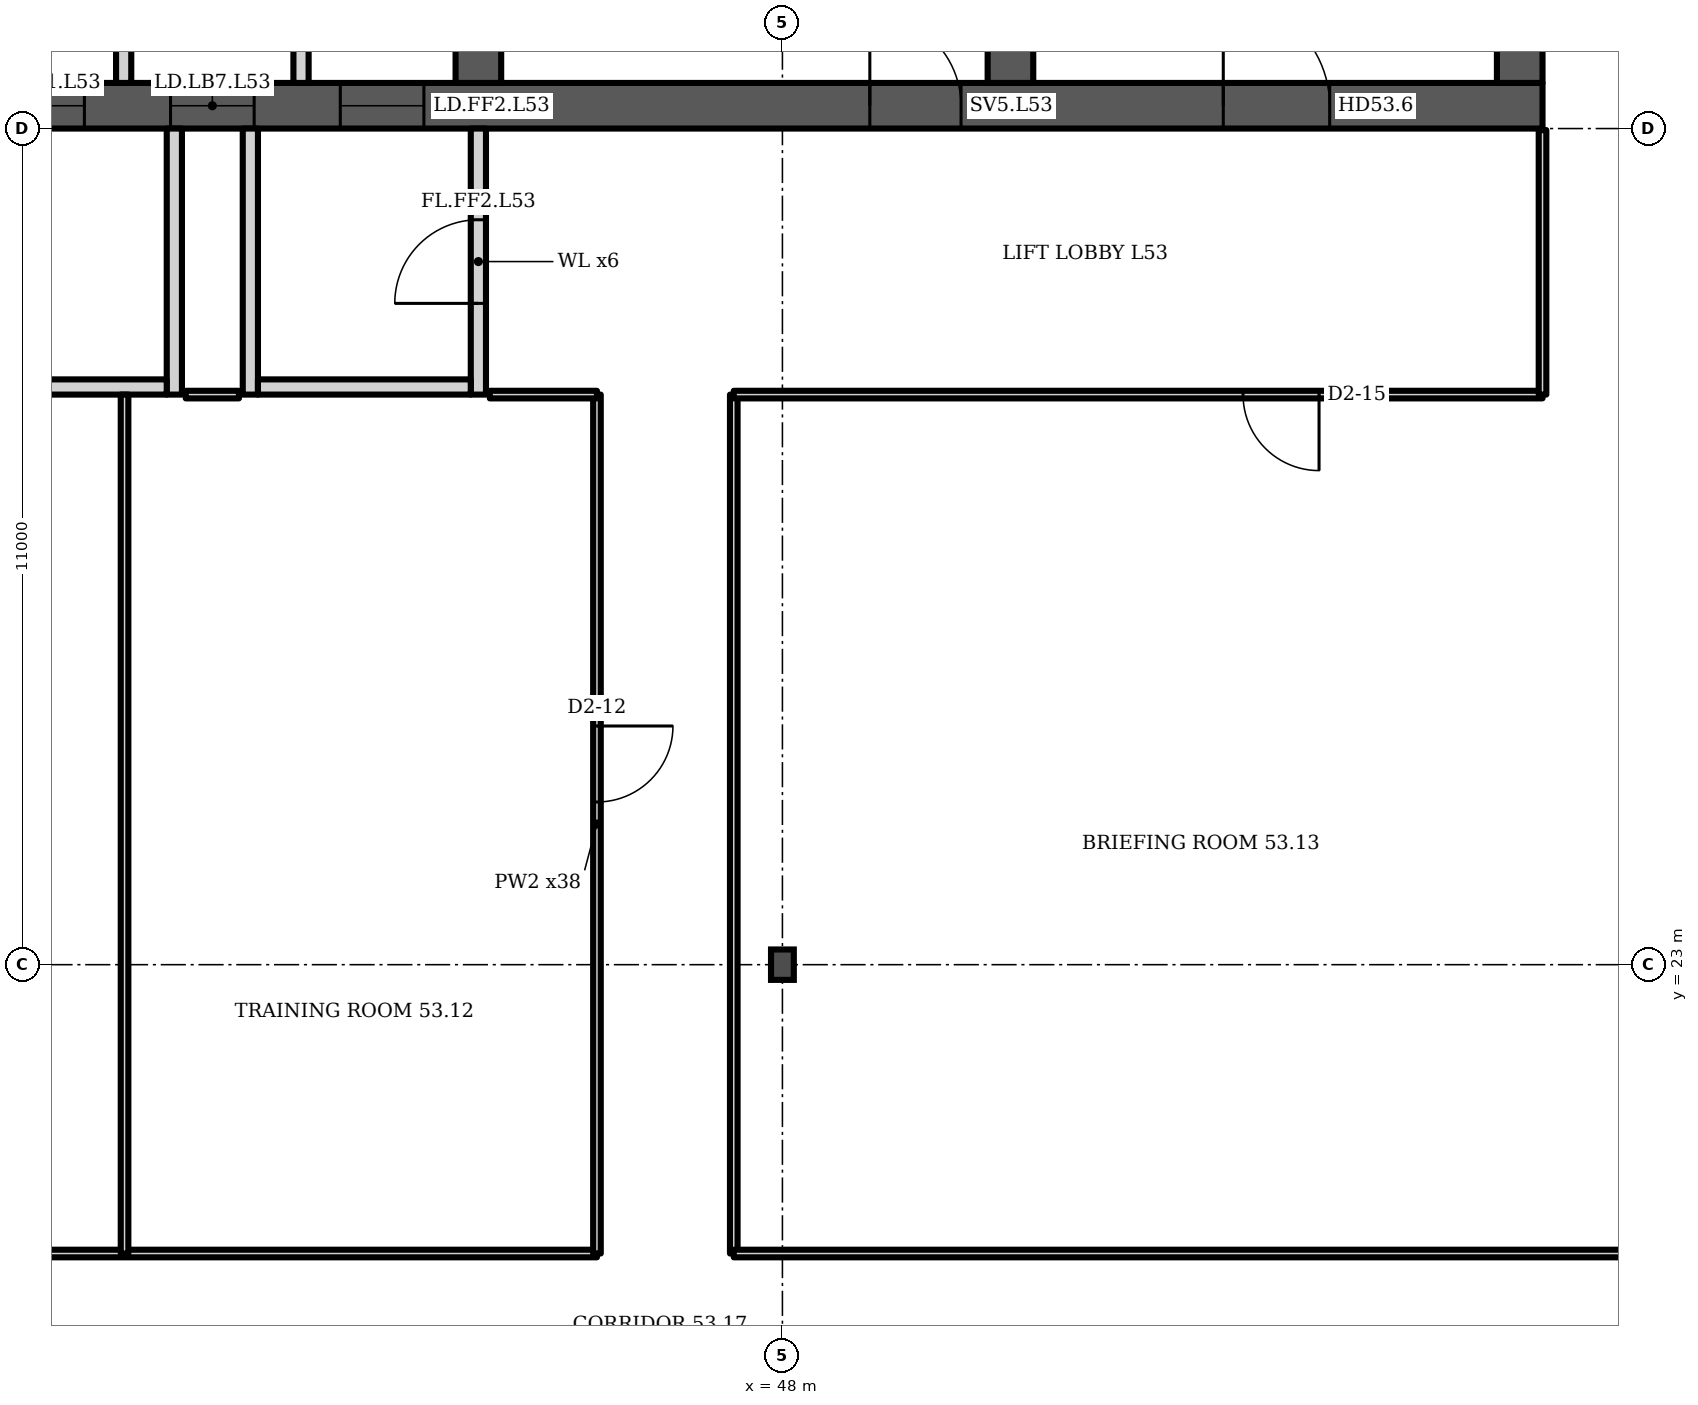
"""IFC4 building model, lengths in metres.
Left out: names, types, materials, properties, quantities, classifications, styles, units other than length and angle.
Written with IfcOpenShell. Run it as: python <this file> out.ifc"""

import sys

from ifc_helpers import new_model, si_unit, direction, frame, frame_2d, origin, origin_2d, place, context, subcontext, project, spatial, polyline, rectangle, i_section, outline, extrude, element, fill, save


model = new_model("IFC4")
c1 = context("Model", 3, precision=1e-05, world=origin(), true_north=direction((0.0, 1.0)))
c2 = subcontext(c1, "Body", "Model", "MODEL_VIEW")
j1 = project(units=[si_unit("LENGTHUNIT", "METRE"), si_unit("PLANEANGLEUNIT", "RADIAN")], contexts=[c1])
p1 = place(None, origin())
s1 = spatial("IfcSite", under=j1, at=p1, CompositionType="ELEMENT")
p2 = place(p1, origin())
s2 = spatial("IfcBuilding", under=s1, at=p2, CompositionType="ELEMENT")
p3 = place(p2, frame((0.0, 0.0, 214.3)))
s3 = spatial("IfcBuildingStorey", under=s2, at=p3, CompositionType="ELEMENT", Elevation=214.3)
p4 = place(p3, frame((23.0, 34.3, 0.0), z_axis=(0.0, 0.0, 1.0), x_axis=(1.0, 0.0, 0.0)))
e1 = element("IfcWall", 1, at=p4, inside=s3, PredefinedType="SHEAR", context=c2, shape_type="SweptSolid", body=[
    extrude(rectangle(XDim=35.0, YDim=0.6, at=frame_2d((17.5, 0.0))), origin(), (0.0, 0.0, 1.0), 3.6),
])
p5 = place(p4, frame((0.65, 0.0, 0.0)))
e2 = element("IfcOpeningElement", 2, at=p5, cuts=e1, PredefinedType="OPENING", context=c2, shape_type="SweptSolid", body=[
    extrude(rectangle(XDim=1.2, YDim=2.1, at=frame_2d((0.6, 1.05))), frame((0.0, 0.31, 0.0), z_axis=(0.0, -1.0, 0.0), x_axis=(1.0, 0.0, 0.0)), (0.0, 0.0, 1.0), 0.62),
])
p6 = place(p4, frame((7.717, 0.0, 0.0)))
e3 = element("IfcOpeningElement", 3, at=p6, cuts=e1, PredefinedType="OPENING", context=c2, shape_type="SweptSolid", body=[
    extrude(rectangle(XDim=1.1, YDim=2.1, at=frame_2d((0.55, 1.05))), frame((0.0, 0.31, 0.0), z_axis=(0.0, -1.0, 0.0), x_axis=(1.0, 0.0, 0.0)), (0.0, 0.0, 1.0), 0.62),
])
p7 = place(p4, frame((12.183, 0.0, 0.0)))
e4 = element("IfcOpeningElement", 4, at=p7, cuts=e1, PredefinedType="OPENING", context=c2, shape_type="SweptSolid", body=[
    extrude(rectangle(XDim=1.1, YDim=2.1, at=frame_2d((0.55, 1.05))), frame((0.0, 0.31, 0.0), z_axis=(0.0, -1.0, 0.0), x_axis=(1.0, 0.0, 0.0)), (0.0, 0.0, 1.0), 0.62),
])
p8 = place(p4, frame((9.8, 0.0, 0.0)))
e5 = element("IfcOpeningElement", 5, at=p8, cuts=e1, PredefinedType="OPENING", context=c2, shape_type="SweptSolid", body=[
    extrude(rectangle(XDim=1.4, YDim=2.1, at=frame_2d((0.7, 1.05))), frame((0.0, 0.31, 0.0), z_axis=(0.0, -1.0, 0.0), x_axis=(1.0, 0.0, 0.0)), (0.0, 0.0, 1.0), 0.62),
])
p9 = place(p4, frame((14.717, 0.0, 0.0)))
e6 = element("IfcOpeningElement", 6, at=p9, cuts=e1, PredefinedType="OPENING", context=c2, shape_type="SweptSolid", body=[
    extrude(rectangle(XDim=1.1, YDim=2.1, at=frame_2d((0.55, 1.05))), frame((0.0, 0.31, 0.0), z_axis=(0.0, -1.0, 0.0), x_axis=(1.0, 0.0, 0.0)), (0.0, 0.0, 1.0), 0.62),
])
p10 = place(p4, frame((16.95, 0.0, 0.0)))
e7 = element("IfcOpeningElement", 7, at=p10, cuts=e1, PredefinedType="OPENING", context=c2, shape_type="SweptSolid", body=[
    extrude(rectangle(XDim=1.1, YDim=2.1, at=frame_2d((0.55, 1.05))), frame((0.0, 0.31, 0.0), z_axis=(0.0, -1.0, 0.0), x_axis=(1.0, 0.0, 0.0)), (0.0, 0.0, 1.0), 0.62),
])
p11 = place(p4, frame((19.183, 0.0, 0.0)))
e8 = element("IfcOpeningElement", 8, at=p11, cuts=e1, PredefinedType="OPENING", context=c2, shape_type="SweptSolid", body=[
    extrude(rectangle(XDim=1.1, YDim=2.1, at=frame_2d((0.55, 1.05))), frame((0.0, 0.31, 0.0), z_axis=(0.0, -1.0, 0.0), x_axis=(1.0, 0.0, 0.0)), (0.0, 0.0, 1.0), 0.62),
])
p12 = place(p4, frame((26.15, 0.0, 0.0)))
e9 = element("IfcOpeningElement", 9, at=p12, cuts=e1, PredefinedType="OPENING", context=c2, shape_type="SweptSolid", body=[
    extrude(rectangle(XDim=1.2, YDim=2.1, at=frame_2d((0.6, 1.05))), frame((0.0, 0.31, 0.0), z_axis=(0.0, -1.0, 0.0), x_axis=(1.0, 0.0, 0.0)), (0.0, 0.0, 1.0), 0.62),
])
p13 = place(p4, frame((30.8, 0.0, 0.0)))
e10 = element("IfcOpeningElement", 10, at=p13, cuts=e1, PredefinedType="OPENING", context=c2, shape_type="SweptSolid", body=[
    extrude(rectangle(XDim=1.4, YDim=2.1, at=frame_2d((0.7, 1.05))), frame((0.0, 0.31, 0.0), z_axis=(0.0, -1.0, 0.0), x_axis=(1.0, 0.0, 0.0)), (0.0, 0.0, 1.0), 0.62),
])
p14 = place(p3, frame((44.0, 34.6, 0.0), z_axis=(0.0, 0.0, 1.0), x_axis=(0.0, 1.0, 0.0)))
e11 = element("IfcWall", 11, at=p14, inside=s3, PredefinedType="SHEAR", context=c2, shape_type="SweptSolid", body=[
    extrude(rectangle(XDim=14.784, YDim=0.6, at=frame_2d((7.392, 0.0))), origin(), (0.0, 0.0, 1.0), 3.6),
])
p15 = place(p14, frame((11.608, 0.0, 0.0)))
e12 = element("IfcOpeningElement", 12, at=p15, cuts=e11, PredefinedType="OPENING", context=c2, shape_type="SweptSolid", body=[
    extrude(rectangle(XDim=1.0, YDim=2.1, at=frame_2d((0.5, 1.05))), frame((0.0, 0.31, 0.0), z_axis=(0.0, -1.0, 0.0), x_axis=(1.0, 0.0, 0.0)), (0.0, 0.0, 1.0), 0.62),
])
p16 = place(p14, frame((3.8, 0.0, 0.0)))
e13 = element("IfcOpeningElement", 13, at=p16, cuts=e11, PredefinedType="OPENING", context=c2, shape_type="SweptSolid", body=[
    extrude(rectangle(XDim=1.1, YDim=2.1, at=frame_2d((0.55, 1.05))), frame((0.0, 0.31, 0.0), z_axis=(0.0, -1.0, 0.0), x_axis=(1.0, 0.0, 0.0)), (0.0, 0.0, 1.0), 0.62),
])
p17 = place(p3, frame((51.0, 34.6, 0.0), z_axis=(0.0, 0.0, 1.0), x_axis=(0.0, 1.0, 0.0)))
e14 = element("IfcWall", 14, at=p17, inside=s3, PredefinedType="SHEAR", context=c2, shape_type="SweptSolid", body=[
    extrude(rectangle(XDim=14.171, YDim=0.6, at=frame_2d((7.085, 0.0))), origin(), (0.0, 0.0, 1.0), 3.6),
])
p18 = place(p17, frame((3.8, 0.0, 0.0)))
e15 = element("IfcOpeningElement", 15, at=p18, cuts=e14, PredefinedType="OPENING", context=c2, shape_type="SweptSolid", body=[
    extrude(rectangle(XDim=1.1, YDim=2.1, at=frame_2d((0.55, 1.05))), frame((0.0, 0.31, 0.0), z_axis=(0.0, -1.0, 0.0), x_axis=(1.0, 0.0, 0.0)), (0.0, 0.0, 1.0), 0.62),
])
p19 = place(p3, frame((57.7, 34.6, 0.0), z_axis=(0.0, 0.0, 1.0), x_axis=(0.0, 1.0, 0.0)))
e16 = element("IfcWall", 16, at=p19, inside=s3, PredefinedType="SHEAR", context=c2, shape_type="SweptSolid", body=[
    extrude(rectangle(XDim=13.585, YDim=0.6, at=frame_2d((6.792, 0.0))), origin(), (0.0, 0.0, 1.0), 3.6),
])
p20 = place(p3, frame((48.0, 23.0, 0.0), z_axis=(0.0, 0.0, 1.0), x_axis=(1.0, 0.0, 0.0)))
e17 = element("IfcColumn", 17, at=p20, inside=s3, PredefinedType="COLUMN", context=c2, shape_type="SweptSolid", body=[
    extrude(i_section(OverallWidth=0.3, OverallDepth=0.4, WebThickness=0.013, FlangeThickness=0.024, FilletRadius=0.027, at=origin_2d()), origin(), (0.0, 0.0, 1.0), 3.6),
])
p21 = place(p3, frame((0.0, 0.0, -0.0)))
e18 = element("IfcWall", 18, at=p21, inside=s3, PredefinedType="PARTITIONING", context=c2, shape_type="SweptSolid", body=[
    extrude(outline(polyline([(41.567, 37.1), (39.433, 37.1), (39.433, 34.6), (39.233, 34.6), (39.233, 37.45), (37.3, 37.45), (37.3, 37.65), (39.233, 37.65), (39.433, 37.65), (39.433, 37.3), (41.567, 37.3), (41.567, 37.35), (41.767, 37.35), (43.7, 37.35), (43.7, 37.15), (41.767, 37.15), (41.767, 34.6), (41.567, 34.6), (41.567, 37.1)])), origin(), (0.0, 0.0, 1.0), 3.2),
])
p22 = place(p3, frame((40.0, 30.5, 0.0), z_axis=(0.0, 0.0, 1.0), x_axis=(0.0, 1.0, 0.0)))
e19 = element("IfcWall", 19, at=p22, inside=s3, PredefinedType="PARTITIONING", context=c2, shape_type="SweptSolid", body=[
    extrude(rectangle(XDim=3.5, YDim=0.2, at=frame_2d((1.75, 0.0))), origin(), (0.0, 0.0, 1.0), 3.2),
])
p23 = place(p3, frame((37.1, 30.6, 0.0), z_axis=(0.0, 0.0, 1.0), x_axis=(1.0, 0.0, 0.0)))
e20 = element("IfcWall", 20, at=p23, inside=s3, PredefinedType="PARTITIONING", context=c2, shape_type="SweptSolid", body=[
    extrude(rectangle(XDim=2.8, YDim=0.2, at=frame_2d((1.4, 0.0))), origin(), (0.0, 0.0, 1.0), 3.2),
])
p24 = place(p3, frame((41.0, 30.5, 0.0), z_axis=(0.0, 0.0, 1.0), x_axis=(0.0, 1.0, 0.0)))
e21 = element("IfcWall", 21, at=p24, inside=s3, PredefinedType="PARTITIONING", context=c2, shape_type="SweptSolid", body=[
    extrude(rectangle(XDim=3.5, YDim=0.2, at=frame_2d((1.75, 0.0))), origin(), (0.0, 0.0, 1.0), 3.2),
])
p25 = place(p3, frame((44.0, 30.5, 0.0), z_axis=(0.0, 0.0, 1.0), x_axis=(0.0, 1.0, 0.0)))
e22 = element("IfcWall", 22, at=p25, inside=s3, PredefinedType="PARTITIONING", context=c2, shape_type="SweptSolid", body=[
    extrude(rectangle(XDim=3.5, YDim=0.2, at=frame_2d((1.75, 0.0))), origin(), (0.0, 0.0, 1.0), 3.2),
])
p26 = place(p25, frame((1.2, 0.0, 0.0)))
e23 = element("IfcOpeningElement", 23, at=p26, cuts=e22, PredefinedType="OPENING", context=c2, shape_type="SweptSolid", body=[
    extrude(rectangle(XDim=1.1, YDim=2.1, at=frame_2d((0.55, 1.05))), frame((0.0, 0.11, 0.0), z_axis=(0.0, -1.0, 0.0), x_axis=(1.0, 0.0, 0.0)), (0.0, 0.0, 1.0), 0.22),
])
p27 = place(p3, frame((41.1, 30.6, 0.0), z_axis=(0.0, 0.0, 1.0), x_axis=(1.0, 0.0, 0.0)))
e24 = element("IfcWall", 24, at=p27, inside=s3, PredefinedType="PARTITIONING", context=c2, shape_type="SweptSolid", body=[
    extrude(rectangle(XDim=2.8, YDim=0.2, at=frame_2d((1.4, 0.0))), origin(), (0.0, 0.0, 1.0), 3.2),
])
p28 = place(p3, frame((24.8, 19.2, 0.0), z_axis=(0.0, 0.0, 1.0), x_axis=(1.0, 0.0, 0.0)))
e25 = element("IfcWall", 25, at=p28, inside=s3, PredefinedType="PARTITIONING", context=c2, shape_type="SweptSolid", body=[
    extrude(rectangle(XDim=20.76, YDim=0.1, at=frame_2d((10.38, 0.0))), origin(), (0.0, 0.0, 1.0), 3.2),
])
p29 = place(p28, frame((5.825, 0.0, 0.0)))
e26 = element("IfcOpeningElement", 26, at=p29, cuts=e25, PredefinedType="OPENING", context=c2, shape_type="SweptSolid", body=[
    extrude(rectangle(XDim=1.0, YDim=2.1, at=frame_2d((0.5, 1.05))), frame((0.0, 0.06, 0.0), z_axis=(0.0, -1.0, 0.0), x_axis=(1.0, 0.0, 0.0)), (0.0, 0.0, 1.0), 0.12),
])
p30 = place(p3, frame((39.345, 19.2, 0.0), z_axis=(0.0, 0.0, 1.0), x_axis=(0.0, 1.0, 0.0)))
e27 = element("IfcWall", 27, at=p30, inside=s3, PredefinedType="PARTITIONING", context=c2, shape_type="SweptSolid", body=[
    extrude(rectangle(XDim=11.3, YDim=0.1, at=frame_2d((5.65, 0.0))), origin(), (0.0, 0.0, 1.0), 3.2),
])
p31 = place(p3, frame((45.56, 19.2, 0.0), z_axis=(0.0, 0.0, 1.0), x_axis=(0.0, 1.0, 0.0)))
e28 = element("IfcWall", 28, at=p31, inside=s3, PredefinedType="PARTITIONING", context=c2, shape_type="SweptSolid", body=[
    extrude(rectangle(XDim=11.3, YDim=0.1, at=frame_2d((5.65, 0.0))), origin(), (0.0, 0.0, 1.0), 3.2),
])
p32 = place(p31, frame((5.94, 0.0, 0.0)))
e29 = element("IfcOpeningElement", 29, at=p32, cuts=e28, PredefinedType="OPENING", context=c2, shape_type="SweptSolid", body=[
    extrude(rectangle(XDim=1.0, YDim=2.1, at=frame_2d((0.5, 1.05))), frame((0.0, 0.06, 0.0), z_axis=(0.0, -1.0, 0.0), x_axis=(1.0, 0.0, 0.0)), (0.0, 0.0, 1.0), 0.12),
])
p33 = place(p3, frame((47.36, 19.2, 0.0), z_axis=(0.0, 0.0, 1.0), x_axis=(0.0, 1.0, 0.0)))
e30 = element("IfcWall", 30, at=p33, inside=s3, PredefinedType="PARTITIONING", context=c2, shape_type="SweptSolid", body=[
    extrude(rectangle(XDim=11.3, YDim=0.1, at=frame_2d((5.65, 0.0))), origin(), (0.0, 0.0, 1.0), 3.2),
])
p34 = place(p3, frame((47.36, 19.2, 0.0), z_axis=(0.0, 0.0, 1.0), x_axis=(1.0, 0.0, 0.0)))
e31 = element("IfcWall", 31, at=p34, inside=s3, PredefinedType="PARTITIONING", context=c2, shape_type="SweptSolid", body=[
    extrude(rectangle(XDim=17.71, YDim=0.1, at=frame_2d((8.855, 0.0))), origin(), (0.0, 0.0, 1.0), 3.2),
])
p35 = place(p3, frame((47.36, 30.5, 0.0), z_axis=(0.0, 0.0, 1.0), x_axis=(1.0, 0.0, 0.0)))
e32 = element("IfcWall", 32, at=p35, inside=s3, PredefinedType="PARTITIONING", context=c2, shape_type="SweptSolid", body=[
    extrude(rectangle(XDim=10.64, YDim=0.1, at=frame_2d((5.32, 0.0))), origin(), (0.0, 0.0, 1.0), 3.2),
])
p36 = place(p35, frame((6.7, 0.0, 0.0)))
e33 = element("IfcOpeningElement", 33, at=p36, cuts=e32, PredefinedType="OPENING", context=c2, shape_type="SweptSolid", body=[
    extrude(rectangle(XDim=1.0, YDim=2.1, at=frame_2d((0.5, 1.05))), frame((0.0, 0.06, 0.0), z_axis=(0.0, -1.0, 0.0), x_axis=(1.0, 0.0, 0.0)), (0.0, 0.0, 1.0), 0.12),
])
p37 = place(p3, frame((58.0, 30.5, 0.0), z_axis=(0.0, 0.0, 1.0), x_axis=(0.0, 1.0, 0.0)))
e34 = element("IfcWall", 34, at=p37, inside=s3, PredefinedType="PARTITIONING", context=c2, shape_type="SweptSolid", body=[
    extrude(rectangle(XDim=3.48, YDim=0.1, at=frame_2d((1.74, 0.0))), origin(), (0.0, 0.0, 1.0), 3.2),
])
p38 = place(p3, frame((40.15, 30.5, 0.0), z_axis=(0.0, 0.0, 1.0), x_axis=(1.0, 0.0, 0.0)))
e35 = element("IfcWall", 35, at=p38, inside=s3, PredefinedType="PARTITIONING", context=c2, shape_type="SweptSolid", body=[
    extrude(rectangle(XDim=0.7, YDim=0.1, at=frame_2d((0.35, 0.0))), origin(), (0.0, 0.0, 1.0), 3.2),
])
p39 = place(p3, frame((44.15, 30.5, 0.0), z_axis=(0.0, 0.0, 1.0), x_axis=(1.0, 0.0, 0.0)))
e36 = element("IfcWall", 36, at=p39, inside=s3, PredefinedType="PARTITIONING", context=c2, shape_type="SweptSolid", body=[
    extrude(rectangle(XDim=1.41, YDim=0.1, at=frame_2d((0.705, 0.0))), origin(), (0.0, 0.0, 1.0), 3.2),
])
p40 = place(p9, origin())
e37 = element("IfcDoor", 37, at=p40, inside=s3, OperationType="DOUBLE_DOOR_SLIDING", PredefinedType="DOOR", context=c2, shape_type="SweptSolid", body=[
    extrude(rectangle(XDim=1.1, YDim=2.1, at=frame_2d((0.55, 1.05))), frame((0.0, 0.025, 0.0), z_axis=(0.0, -1.0, 0.0), x_axis=(1.0, 0.0, 0.0)), (0.0, 0.0, 1.0), 0.05),
])
fill(e6, e37)
p41 = place(p10, origin())
e38 = element("IfcDoor", 38, at=p41, inside=s3, OperationType="DOUBLE_DOOR_SLIDING", PredefinedType="DOOR", context=c2, shape_type="SweptSolid", body=[
    extrude(rectangle(XDim=1.1, YDim=2.1, at=frame_2d((0.55, 1.05))), frame((0.0, 0.025, 0.0), z_axis=(0.0, -1.0, 0.0), x_axis=(1.0, 0.0, 0.0)), (0.0, 0.0, 1.0), 0.05),
])
fill(e7, e38)
p42 = place(p11, origin())
e39 = element("IfcDoor", 39, at=p42, inside=s3, OperationType="DOUBLE_DOOR_SLIDING", PredefinedType="DOOR", context=c2, shape_type="SweptSolid", body=[
    extrude(rectangle(XDim=1.1, YDim=2.1, at=frame_2d((0.55, 1.05))), frame((0.0, 0.025, 0.0), z_axis=(0.0, -1.0, 0.0), x_axis=(1.0, 0.0, 0.0)), (0.0, 0.0, 1.0), 0.05),
])
fill(e8, e39)
p43 = place(p12, origin())
e40 = element("IfcDoor", 40, at=p43, inside=s3, OperationType="SINGLE_SWING_LEFT", PredefinedType="DOOR", context=c2, shape_type="SweptSolid", body=[
    extrude(rectangle(XDim=1.2, YDim=2.1, at=frame_2d((0.6, 1.05))), frame((0.0, 0.025, 0.0), z_axis=(0.0, -1.0, 0.0), x_axis=(1.0, 0.0, 0.0)), (0.0, 0.0, 1.0), 0.05),
])
fill(e9, e40)
p44 = place(p13, origin())
e41 = element("IfcDoor", 41, at=p44, inside=s3, OperationType="DOUBLE_DOOR_SINGLE_SWING", PredefinedType="DOOR", context=c2, shape_type="SweptSolid", body=[
    extrude(rectangle(XDim=1.4, YDim=2.1, at=frame_2d((0.7, 1.05))), frame((0.0, 0.025, 0.0), z_axis=(0.0, -1.0, 0.0), x_axis=(1.0, 0.0, 0.0)), (0.0, 0.0, 1.0), 0.05),
])
fill(e10, e41)
p45 = place(p26, origin())
e42 = element("IfcDoor", 42, at=p45, inside=s3, OperationType="SINGLE_SWING_LEFT", PredefinedType="DOOR", context=c2, shape_type="SweptSolid", body=[
    extrude(rectangle(XDim=1.1, YDim=2.1, at=frame_2d((0.55, 1.05))), frame((0.0, 0.025, 0.0), z_axis=(0.0, -1.0, 0.0), x_axis=(1.0, 0.0, 0.0)), (0.0, 0.0, 1.0), 0.05),
])
fill(e23, e42)
p46 = place(p32, origin())
e43 = element("IfcDoor", 43, at=p46, inside=s3, OperationType="SINGLE_SWING_RIGHT", PredefinedType="DOOR", context=c2, shape_type="SweptSolid", body=[
    extrude(rectangle(XDim=1.0, YDim=2.1, at=frame_2d((0.5, 1.05))), frame((0.0, 0.025, 0.0), z_axis=(0.0, -1.0, 0.0), x_axis=(1.0, 0.0, 0.0)), (0.0, 0.0, 1.0), 0.05),
])
fill(e29, e43)
p47 = place(p36, origin())
e44 = element("IfcDoor", 44, at=p47, inside=s3, OperationType="SINGLE_SWING_RIGHT", PredefinedType="DOOR", context=c2, shape_type="SweptSolid", body=[
    extrude(rectangle(XDim=1.0, YDim=2.1, at=frame_2d((0.5, 1.05))), frame((0.0, 0.025, 0.0), z_axis=(0.0, -1.0, 0.0), x_axis=(1.0, 0.0, 0.0)), (0.0, 0.0, 1.0), 0.05),
])
fill(e33, e44)
save(model, sys.argv[1])
